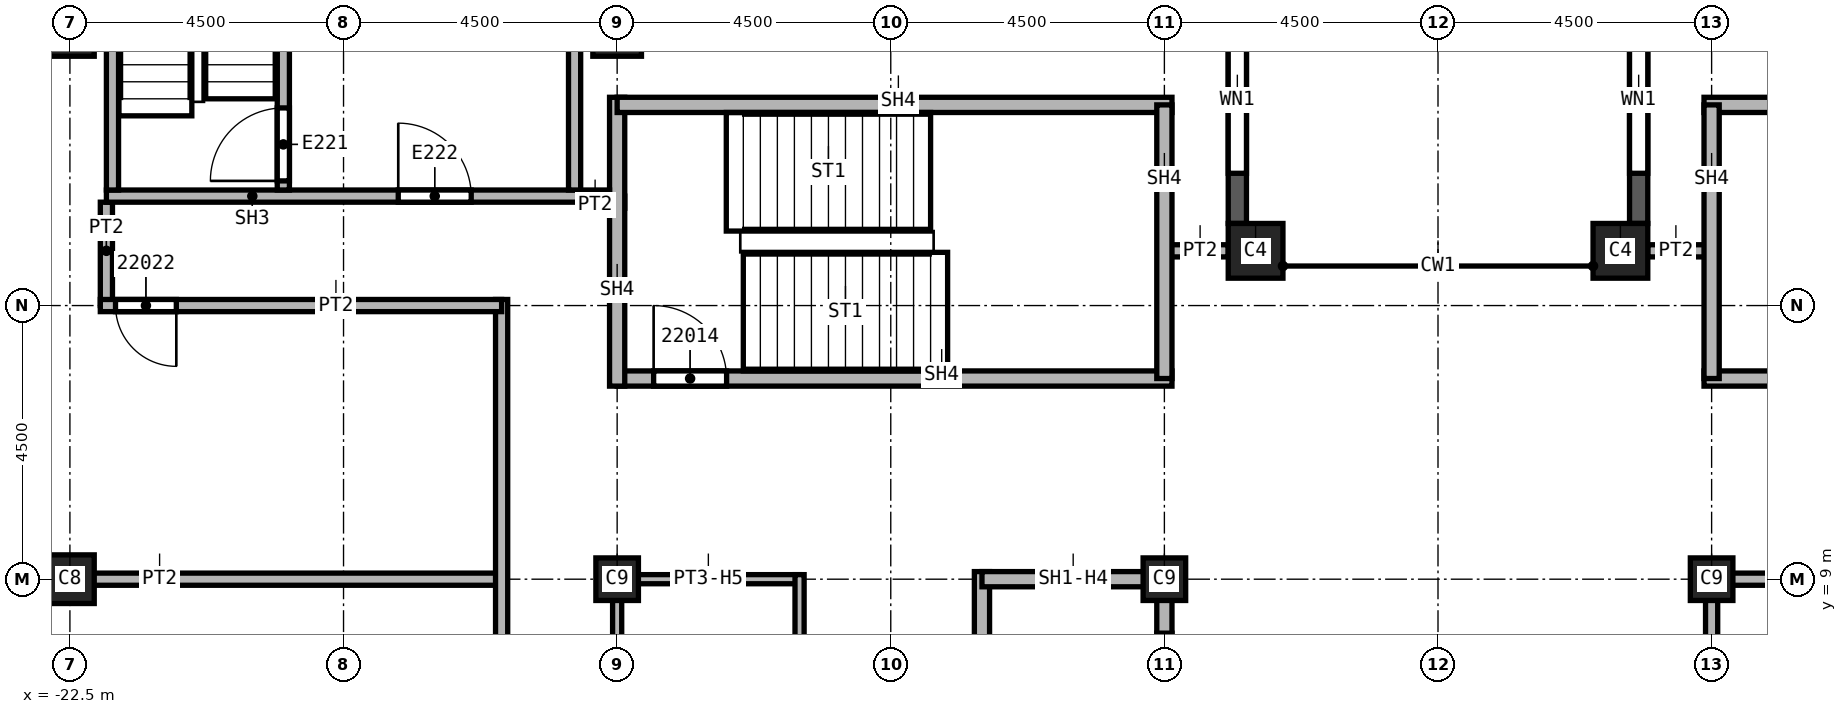
"""IFC4 building model, lengths in metres.
Left out: names, types, materials, properties, quantities, classifications, styles, units other than length and angle.
Written with IfcOpenShell. Run it as: python <this file> out.ifc"""

import sys

from ifc_helpers import new_model, si_unit, direction, frame, frame_2d, origin, origin_2d, place, context, subcontext, project, spatial, rectangle, extrude, element, fill, save


model = new_model("IFC4")
c1 = context("Model", 3, precision=1e-05, world=origin(), true_north=direction((0.0, 1.0)))
c2 = subcontext(c1, "Body", "Model", "MODEL_VIEW")
j1 = project(units=[si_unit("LENGTHUNIT", "METRE"), si_unit("PLANEANGLEUNIT", "RADIAN")], contexts=[c1])
p1 = place(None, origin())
s1 = spatial("IfcSite", under=j1, at=p1, CompositionType="ELEMENT")
p2 = place(p1, origin())
s2 = spatial("IfcBuilding", under=s1, at=p2, CompositionType="ELEMENT")
p3 = place(p2, frame((0.0, 0.0, 316.0)))
s3 = spatial("IfcBuildingStorey", under=s2, at=p3, CompositionType="ELEMENT", Elevation=316.0)
for number, where, z_axis, x_axis in (
    (1, (-13.5, 18.0, 0.0), (0.0, 0.0, 1.0), (1.0, 0.0, 0.0)),
    (2, (-22.5, 9.0, 0.0), (0.0, 0.0, 1.0), (1.0, 0.0, 0.0)),
    (3, (-22.5, 18.0, 0.0), (0.0, 0.0, 1.0), (1.0, 0.0, 0.0)),
):
    element("IfcColumn", number, at=place(p3, frame(where, z_axis=z_axis, x_axis=x_axis)), inside=s3, PredefinedType="COLUMN", context=c2, shape_type="SweptSolid", body=[
        extrude(rectangle(XDim=0.8, YDim=0.8, at=origin_2d()), origin(), (0.0, 0.0, 1.0), 3.59),
    ])
for number, where, z_axis, x_axis in (
    (4, (4.5, 9.0, 0.0), (0.0, 0.0, 1.0), (1.0, 0.0, 0.0)),
    (5, (-4.5, 9.0, 0.0), (0.0, 0.0, 1.0), (1.0, 0.0, 0.0)),
    (6, (-13.5, 9.0, 0.0), (0.0, 0.0, 1.0), (1.0, 0.0, 0.0)),
):
    element("IfcColumn", number, at=place(p3, frame(where, z_axis=z_axis, x_axis=x_axis)), inside=s3, PredefinedType="COLUMN", context=c2, shape_type="SweptSolid", body=[
        extrude(rectangle(XDim=0.7, YDim=0.7, at=origin_2d()), origin(), (0.0, 0.0, 1.0), 3.59),
    ])
for number, where, z_axis, x_axis in (
    (7, (3.0, 14.4, 0.0), (0.0, 0.0, 1.0), (1.0, 0.0, 0.0)),
    (8, (-3.0, 14.4, 0.0), (0.0, 0.0, 1.0), (1.0, 0.0, 0.0)),
):
    element("IfcColumn", number, at=place(p3, frame(where, z_axis=z_axis, x_axis=x_axis)), inside=s3, PredefinedType="COLUMN", context=c2, shape_type="SweptSolid", body=[
        extrude(rectangle(XDim=0.9, YDim=0.9, at=origin_2d()), origin(), (0.0, 0.0, 1.0), 3.59),
    ])
p4 = place(p3, frame((3.3, 22.95, 0.0), z_axis=(0.0, 0.0, 1.0), x_axis=(0.0, -1.0, 0.0)))
e9 = element("IfcWall", 9, at=p4, inside=s3, PredefinedType="SOLIDWALL", context=c2, shape_type="SweptSolid", body=[
    extrude(rectangle(XDim=8.1, YDim=0.3, at=frame_2d((4.05, 0.0))), origin(), (0.0, 0.0, 1.0), 2.99),
])
p5 = place(p4, frame((0.825, 0.0, 0.8)))
e10 = element("IfcOpeningElement", 10, at=p5, cuts=e9, PredefinedType="OPENING", context=c2, shape_type="SweptSolid", body=[
    extrude(rectangle(XDim=2.4, YDim=1.95, at=frame_2d((1.2, 0.975))), frame((0.0, 0.15, 0.0), z_axis=(0.0, -1.0, 0.0), x_axis=(1.0, 0.0, 0.0)), (0.0, 0.0, 1.0), 0.3),
])
p6 = place(p4, frame((4.875, 0.0, 0.8)))
e11 = element("IfcOpeningElement", 11, at=p6, cuts=e9, PredefinedType="OPENING", context=c2, shape_type="SweptSolid", body=[
    extrude(rectangle(XDim=2.4, YDim=1.95, at=frame_2d((1.2, 0.975))), frame((0.0, 0.15, 0.0), z_axis=(0.0, -1.0, 0.0), x_axis=(1.0, 0.0, 0.0)), (0.0, 0.0, 1.0), 0.3),
])
p7 = place(p3, frame((-3.3, 14.85, 0.0), z_axis=(0.0, 0.0, 1.0), x_axis=(0.0, 1.0, 0.0)))
e12 = element("IfcWall", 12, at=p7, inside=s3, PredefinedType="SOLIDWALL", context=c2, shape_type="SweptSolid", body=[
    extrude(rectangle(XDim=8.1, YDim=0.3, at=frame_2d((4.05, 0.0))), origin(), (0.0, 0.0, 1.0), 2.99),
])
p8 = place(p7, frame((0.825, 0.0, 0.8)))
e13 = element("IfcOpeningElement", 13, at=p8, cuts=e12, PredefinedType="OPENING", context=c2, shape_type="SweptSolid", body=[
    extrude(rectangle(XDim=2.4, YDim=1.95, at=frame_2d((1.2, 0.975))), frame((0.0, 0.15, 0.0), z_axis=(0.0, -1.0, 0.0), x_axis=(1.0, 0.0, 0.0)), (0.0, 0.0, 1.0), 0.3),
])
p9 = place(p7, frame((4.875, 0.0, 0.8)))
e14 = element("IfcOpeningElement", 14, at=p9, cuts=e12, PredefinedType="OPENING", context=c2, shape_type="SweptSolid", body=[
    extrude(rectangle(XDim=2.4, YDim=1.95, at=frame_2d((1.2, 0.975))), frame((0.0, 0.15, 0.0), z_axis=(0.0, -1.0, 0.0), x_axis=(1.0, 0.0, 0.0)), (0.0, 0.0, 1.0), 0.3),
])
p10 = place(p3, frame((-26.55, 9.0, 0.0), z_axis=(0.0, 0.0, 1.0), x_axis=(1.0, 0.0, 0.0)))
e15 = element("IfcWall", 15, at=p10, inside=s3, PredefinedType="PARTITIONING", context=c2, shape_type="SweptSolid", body=[
    extrude(rectangle(XDim=11.15, YDim=0.2, at=frame_2d((5.575, 0.0))), origin(), (0.0, 0.0, 1.0), 3.59),
])
p11 = place(p3, frame((-21.9, 13.5, 0.0), z_axis=(0.0, 0.0, 1.0), x_axis=(0.0, 1.0, 0.0)))
e16 = element("IfcWall", 16, at=p11, inside=s3, PredefinedType="PARTITIONING", context=c2, shape_type="SweptSolid", body=[
    extrude(rectangle(XDim=1.7, YDim=0.2, at=frame_2d((0.85, 0.0))), origin(), (0.0, 0.0, 1.0), 3.59),
])
p12 = place(p3, frame((-15.4, -22.95, 0.0), z_axis=(0.0, 0.0, 1.0), x_axis=(0.0, 1.0, 0.0)))
e17 = element("IfcWall", 17, at=p12, inside=s3, PredefinedType="PARTITIONING", context=c2, shape_type="SweptSolid", body=[
    extrude(rectangle(XDim=36.55, YDim=0.2, at=frame_2d((18.275, 0.0))), origin(), (0.0, 0.0, 1.0), 3.59),
])
p13 = place(p12, frame((24.3, 0.0, 0.0)))
e18 = element("IfcOpeningElement", 18, at=p13, cuts=e17, PredefinedType="OPENING", context=c2, shape_type="SweptSolid", body=[
    extrude(rectangle(XDim=1.0, YDim=2.1, at=frame_2d((0.5, 1.05))), frame((0.0, 0.1, 0.0), z_axis=(0.0, -1.0, 0.0), x_axis=(1.0, 0.0, 0.0)), (0.0, 0.0, 1.0), 0.2),
])
p14 = place(p12, frame((9.4, 0.0, 0.0)))
e19 = element("IfcOpeningElement", 19, at=p14, cuts=e17, PredefinedType="OPENING", context=c2, shape_type="SweptSolid", body=[
    extrude(rectangle(XDim=1.0, YDim=2.1, at=frame_2d((0.5, 1.05))), frame((0.0, 0.1, 0.0), z_axis=(0.0, -1.0, 0.0), x_axis=(1.0, 0.0, 0.0)), (0.0, 0.0, 1.0), 0.2),
])
p15 = place(p12, frame((19.05, 0.0, 0.0)))
e20 = element("IfcOpeningElement", 20, at=p15, cuts=e17, PredefinedType="OPENING", context=c2, shape_type="SweptSolid", body=[
    extrude(rectangle(XDim=1.0, YDim=2.1, at=frame_2d((0.5, 1.05))), frame((0.0, 0.1, 0.0), z_axis=(0.0, -1.0, 0.0), x_axis=(1.0, 0.0, 0.0)), (0.0, 0.0, 1.0), 0.2),
])
p16 = place(p3, frame((-15.4, 13.5, 0.0), z_axis=(0.0, 0.0, 1.0), x_axis=(-1.0, 0.0, 0.0)))
e21 = element("IfcWall", 21, at=p16, inside=s3, PredefinedType="PARTITIONING", context=c2, shape_type="SweptSolid", body=[
    extrude(rectangle(XDim=6.6, YDim=0.2, at=frame_2d((3.3, 0.0))), origin(), (0.0, 0.0, 1.0), 3.59),
])
p17 = place(p16, frame((5.35, 0.0, 0.0)))
e22 = element("IfcOpeningElement", 22, at=p17, cuts=e21, PredefinedType="OPENING", context=c2, shape_type="SweptSolid", body=[
    extrude(rectangle(XDim=1.0, YDim=2.1, at=frame_2d((0.5, 1.05))), frame((0.0, 0.1, 0.0), z_axis=(0.0, -1.0, 0.0), x_axis=(1.0, 0.0, 0.0)), (0.0, 0.0, 1.0), 0.2),
])
p18 = place(p3, frame((-14.1, 15.2, 0.0), z_axis=(0.0, 0.0, 1.0), x_axis=(1.0, 0.0, 0.0)))
e23 = element("IfcWall", 23, at=p18, inside=s3, PredefinedType="PARTITIONING", context=c2, shape_type="SweptSolid", body=[
    extrude(rectangle(XDim=0.725, YDim=0.2, at=frame_2d((0.363, 0.0))), origin(), (0.0, 0.0, 1.0), 3.59),
])
for number, where, z_axis, x_axis in (
    (24, (-4.5, 14.4, 0.0), (0.0, 0.0, 1.0), (1.0, 0.0, 0.0)),
    (25, (3.45, 14.4, 0.0), (0.0, 0.0, 1.0), (1.0, 0.0, 0.0)),
):
    element("IfcWall", number, at=place(p3, frame(where, z_axis=z_axis, x_axis=x_axis)), inside=s3, PredefinedType="PARTITIONING", context=c2, shape_type="SweptSolid", body=[
        extrude(rectangle(XDim=1.05, YDim=0.2, at=frame_2d((0.525, 0.0))), origin(), (0.0, 0.0, 1.0), 3.59),
    ])
p19 = place(p3, frame((4.5, -6.0, 0.0), z_axis=(0.0, 0.0, 1.0), x_axis=(0.0, 1.0, 0.0)))
e26 = element("IfcWall", 26, at=p19, inside=s3, PredefinedType="SOLIDWALL", context=c2, shape_type="SweptSolid", body=[
    extrude(rectangle(XDim=15.1, YDim=0.2, at=frame_2d((7.55, 0.0))), origin(), (0.0, 0.0, 1.0), 2.828),
])
p20 = place(p19, frame((3.1, 0.0, 0.0)))
e27 = element("IfcOpeningElement", 27, at=p20, cuts=e26, PredefinedType="OPENING", context=c2, shape_type="SweptSolid", body=[
    extrude(rectangle(XDim=1.1, YDim=2.1, at=frame_2d((0.55, 1.05))), frame((0.0, 0.1, 0.0), z_axis=(0.0, -1.0, 0.0), x_axis=(1.0, 0.0, 0.0)), (0.0, 0.0, 1.0), 0.2),
])
p21 = place(p19, frame((9.7, 0.0, 0.0)))
e28 = element("IfcOpeningElement", 28, at=p21, cuts=e26, PredefinedType="OPENING", context=c2, shape_type="SweptSolid", body=[
    extrude(rectangle(XDim=1.1, YDim=2.1, at=frame_2d((0.55, 1.05))), frame((0.0, 0.1, 0.0), z_axis=(0.0, -1.0, 0.0), x_axis=(1.0, 0.0, 0.0)), (0.0, 0.0, 1.0), 0.2),
])
p22 = place(p3, frame((4.5, 9.0, 0.0), z_axis=(0.0, 0.0, 1.0), x_axis=(1.0, 0.0, 0.0)))
e29 = element("IfcWall", 29, at=p22, inside=s3, PredefinedType="SOLIDWALL", context=c2, shape_type="SweptSolid", body=[
    extrude(rectangle(XDim=3.0, YDim=0.2, at=frame_2d((1.5, 0.0))), origin(), (0.0, 0.0, 1.0), 2.828),
])
p23 = place(p3, frame((-7.5, 6.0, 0.0), z_axis=(0.0, 0.0, 1.0), x_axis=(0.0, 1.0, 0.0)))
e30 = element("IfcWall", 30, at=p23, inside=s3, PredefinedType="SOLIDWALL", context=c2, shape_type="SweptSolid", body=[
    extrude(rectangle(XDim=3.125, YDim=0.25, at=frame_2d((1.562, 0.0))), origin(), (0.0, 0.0, 1.0), 3.59),
])
p24 = place(p3, frame((-7.5, 9.0, 0.0), z_axis=(0.0, 0.0, 1.0), x_axis=(1.0, 0.0, 0.0)))
e31 = element("IfcWall", 31, at=p24, inside=s3, PredefinedType="SOLIDWALL", context=c2, shape_type="SweptSolid", body=[
    extrude(rectangle(XDim=3.0, YDim=0.25, at=frame_2d((1.5, 0.0))), origin(), (0.0, 0.0, 1.0), 2.828),
])
p25 = place(p3, frame((-4.5, 9.125, 0.0), z_axis=(0.0, 0.0, 1.0), x_axis=(0.0, -1.0, 0.0)))
e32 = element("IfcWall", 32, at=p25, inside=s3, PredefinedType="SOLIDWALL", context=c2, shape_type="SweptSolid", body=[
    extrude(rectangle(XDim=3.125, YDim=0.25, at=frame_2d((1.562, 0.0))), origin(), (0.0, 0.0, 1.0), 2.828),
])
p26 = place(p25, frame((1.012, 0.0, 0.0)))
e33 = element("IfcOpeningElement", 33, at=p26, cuts=e32, PredefinedType="OPENING", context=c2, shape_type="SweptSolid", body=[
    extrude(rectangle(XDim=1.1, YDim=2.1, at=frame_2d((0.55, 1.05))), frame((0.0, 0.125, 0.0), z_axis=(0.0, -1.0, 0.0), x_axis=(1.0, 0.0, 0.0)), (0.0, 0.0, 1.0), 0.25),
])
p27 = place(p3, frame((-13.5, 12.3, 0.0), z_axis=(0.0, 0.0, 1.0), x_axis=(1.0, 0.0, 0.0)))
e34 = element("IfcWall", 34, at=p27, inside=s3, PredefinedType="SOLIDWALL", context=c2, shape_type="SweptSolid", body=[
    extrude(rectangle(XDim=9.125, YDim=0.25, at=frame_2d((4.562, 0.0))), origin(), (0.0, 0.0, 1.0), 3.59),
])
p28 = place(p27, frame((0.6, 0.0, 0.0)))
e35 = element("IfcOpeningElement", 35, at=p28, cuts=e34, PredefinedType="OPENING", context=c2, shape_type="SweptSolid", body=[
    extrude(rectangle(XDim=1.2, YDim=2.1, at=frame_2d((0.6, 1.05))), frame((0.0, 0.125, 0.0), z_axis=(0.0, -1.0, 0.0), x_axis=(1.0, 0.0, 0.0)), (0.0, 0.0, 1.0), 0.25),
])
p29 = place(p3, frame((-13.5, 12.175, 0.0), z_axis=(0.0, 0.0, 1.0), x_axis=(0.0, 1.0, 0.0)))
e36 = element("IfcWall", 36, at=p29, inside=s3, PredefinedType="SOLIDWALL", context=c2, shape_type="SweptSolid", body=[
    extrude(rectangle(XDim=4.75, YDim=0.25, at=frame_2d((2.375, 0.0))), origin(), (0.0, 0.0, 1.0), 3.59),
])
p30 = place(p3, frame((-13.5, 16.8, 0.0), z_axis=(0.0, 0.0, 1.0), x_axis=(1.0, 0.0, 0.0)))
e37 = element("IfcWall", 37, at=p30, inside=s3, PredefinedType="SOLIDWALL", context=c2, shape_type="SweptSolid", body=[
    extrude(rectangle(XDim=9.125, YDim=0.25, at=frame_2d((4.562, 0.0))), origin(), (0.0, 0.0, 1.0), 3.59),
])
p31 = place(p3, frame((-4.5, 16.8, 0.0), z_axis=(0.0, 0.0, 1.0), x_axis=(0.0, -1.0, 0.0)))
e38 = element("IfcWall", 38, at=p31, inside=s3, PredefinedType="SOLIDWALL", context=c2, shape_type="SweptSolid", body=[
    extrude(rectangle(XDim=4.5, YDim=0.25, at=frame_2d((2.25, 0.0))), origin(), (0.0, 0.0, 1.0), 3.59),
])
p32 = place(p3, frame((4.375, 12.3, 0.0), z_axis=(0.0, 0.0, 1.0), x_axis=(1.0, 0.0, 0.0)))
e39 = element("IfcWall", 39, at=p32, inside=s3, PredefinedType="SOLIDWALL", context=c2, shape_type="SweptSolid", body=[
    extrude(rectangle(XDim=9.125, YDim=0.25, at=frame_2d((4.562, 0.0))), origin(), (0.0, 0.0, 1.0), 3.59),
])
p33 = place(p32, frame((7.2, 0.0, 0.0)))
e40 = element("IfcOpeningElement", 40, at=p33, cuts=e39, PredefinedType="OPENING", context=c2, shape_type="SweptSolid", body=[
    extrude(rectangle(XDim=1.2, YDim=2.1, at=frame_2d((0.6, 1.05))), frame((0.0, 0.125, 0.0), z_axis=(0.0, -1.0, 0.0), x_axis=(1.0, 0.0, 0.0)), (0.0, 0.0, 1.0), 0.25),
])
p34 = place(p3, frame((4.375, 16.8, 0.0), z_axis=(0.0, 0.0, 1.0), x_axis=(1.0, 0.0, 0.0)))
e41 = element("IfcWall", 41, at=p34, inside=s3, PredefinedType="SOLIDWALL", context=c2, shape_type="SweptSolid", body=[
    extrude(rectangle(XDim=9.125, YDim=0.25, at=frame_2d((4.562, 0.0))), origin(), (0.0, 0.0, 1.0), 3.59),
])
p35 = place(p3, frame((4.5, 12.3, 0.0), z_axis=(0.0, 0.0, 1.0), x_axis=(0.0, 1.0, 0.0)))
e42 = element("IfcWall", 42, at=p35, inside=s3, PredefinedType="SOLIDWALL", context=c2, shape_type="SweptSolid", body=[
    extrude(rectangle(XDim=4.5, YDim=0.25, at=frame_2d((2.25, 0.0))), origin(), (0.0, 0.0, 1.0), 3.59),
])
p36 = place(p3, frame((-13.5, 3.0, 0.0), z_axis=(0.0, 0.0, 1.0), x_axis=(0.0, 1.0, 0.0)))
e43 = element("IfcWall", 43, at=p36, inside=s3, PredefinedType="PARTITIONING", context=c2, shape_type="SweptSolid", body=[
    extrude(rectangle(XDim=6.075, YDim=0.15, at=frame_2d((3.038, 0.0))), origin(), (0.0, 0.0, 1.0), 2.828),
])
p37 = place(p3, frame((-13.5, 9.0, 0.0), z_axis=(0.0, 0.0, 1.0), x_axis=(1.0, 0.0, 0.0)))
e44 = element("IfcWall", 44, at=p37, inside=s3, PredefinedType="PARTITIONING", context=c2, shape_type="SweptSolid", body=[
    extrude(rectangle(XDim=3.0, YDim=0.15, at=frame_2d((1.5, 0.0))), origin(), (0.0, 0.0, 1.0), 2.828),
])
p38 = place(p3, frame((-10.5, 2.875, 0.0), z_axis=(0.0, 0.0, 1.0), x_axis=(0.0, 1.0, 0.0)))
e45 = element("IfcWall", 45, at=p38, inside=s3, PredefinedType="PARTITIONING", context=c2, shape_type="SweptSolid", body=[
    extrude(rectangle(XDim=6.2, YDim=0.15, at=frame_2d((3.1, 0.0))), origin(), (0.0, 0.0, 1.0), 3.59),
])
p39 = place(p38, frame((3.55, 0.0, 0.0)))
e46 = element("IfcOpeningElement", 46, at=p39, cuts=e45, PredefinedType="OPENING", context=c2, shape_type="SweptSolid", body=[
    extrude(rectangle(XDim=0.9, YDim=2.1, at=frame_2d((0.45, 1.05))), frame((0.0, 0.075, 0.0), z_axis=(0.0, -1.0, 0.0), x_axis=(1.0, 0.0, 0.0)), (0.0, 0.0, 1.0), 0.15),
])
p40 = place(p3, frame((-21.9, 15.3, 0.0), z_axis=(0.0, 0.0, 1.0), x_axis=(1.0, 0.0, 0.0)))
e47 = element("IfcWall", 47, at=p40, inside=s3, PredefinedType="SOLIDWALL", context=c2, shape_type="SweptSolid", body=[
    extrude(rectangle(XDim=8.275, YDim=0.2, at=frame_2d((4.137, 0.0))), origin(), (0.0, 0.0, 1.0), 3.59),
])
p41 = place(p40, frame((4.8, 0.0, 0.0)))
e48 = element("IfcOpeningElement", 48, at=p41, cuts=e47, PredefinedType="OPENING", context=c2, shape_type="SweptSolid", body=[
    extrude(rectangle(XDim=1.2, YDim=2.1, at=frame_2d((0.6, 1.05))), frame((0.0, 0.1, 0.0), z_axis=(0.0, -1.0, 0.0), x_axis=(1.0, 0.0, 0.0)), (0.0, 0.0, 1.0), 0.2),
])
for number, where, z_axis, x_axis in (
    (49, (-21.8, 15.4, 0.0), (0.0, 0.0, 1.0), (0.0, 1.0, 0.0)),
    (50, (-14.2, 15.4, 0.0), (0.0, 0.0, 1.0), (0.0, 1.0, 0.0)),
):
    element("IfcWall", number, at=place(p3, frame(where, z_axis=z_axis, x_axis=x_axis)), inside=s3, PredefinedType="SOLIDWALL", context=c2, shape_type="SweptSolid", body=[
        extrude(rectangle(XDim=5.9, YDim=0.2, at=frame_2d((2.95, 0.0))), origin(), (0.0, 0.0, 1.0), 3.59),
    ])
p42 = place(p3, frame((-18.99, 15.4, 0.0), z_axis=(0.0, 0.0, 1.0), x_axis=(0.0, 1.0, 0.0)))
e51 = element("IfcWall", 51, at=p42, inside=s3, PredefinedType="SOLIDWALL", context=c2, shape_type="SweptSolid", body=[
    extrude(rectangle(XDim=5.9, YDim=0.2, at=frame_2d((2.95, 0.0))), origin(), (0.0, 0.0, 1.0), 3.59),
])
p43 = place(p42, frame((0.15, 0.0, 0.0)))
e52 = element("IfcOpeningElement", 52, at=p43, cuts=e51, PredefinedType="OPENING", context=c2, shape_type="SweptSolid", body=[
    extrude(rectangle(XDim=1.2, YDim=2.1, at=frame_2d((0.6, 1.05))), frame((0.0, 0.1, 0.0), z_axis=(0.0, -1.0, 0.0), x_axis=(1.0, 0.0, 0.0)), (0.0, 0.0, 1.0), 0.2),
])
p44 = place(p6, origin())
e53 = element("IfcWindow", 53, at=p44, inside=s3, PartitioningType="SINGLE_PANEL", PredefinedType="WINDOW", context=c2, shape_type="SweptSolid", body=[
    extrude(rectangle(XDim=2.4, YDim=1.95, at=frame_2d((1.2, 0.975))), frame((0.0, 0.03, 0.0), z_axis=(0.0, -1.0, 0.0), x_axis=(1.0, 0.0, 0.0)), (0.0, 0.0, 1.0), 0.06),
])
fill(e11, e53)
p45 = place(p8, origin())
e54 = element("IfcWindow", 54, at=p45, inside=s3, PartitioningType="SINGLE_PANEL", PredefinedType="WINDOW", context=c2, shape_type="SweptSolid", body=[
    extrude(rectangle(XDim=2.4, YDim=1.95, at=frame_2d((1.2, 0.975))), frame((0.0, 0.03, 0.0), z_axis=(0.0, -1.0, 0.0), x_axis=(1.0, 0.0, 0.0)), (0.0, 0.0, 1.0), 0.06),
])
fill(e13, e54)
p46 = place(p28, origin())
e55 = element("IfcDoor", 55, at=p46, inside=s3, OperationType="SINGLE_SWING_LEFT", PredefinedType="DOOR", context=c2, shape_type="SweptSolid", body=[
    extrude(rectangle(XDim=1.2, YDim=2.1, at=frame_2d((0.6, 1.05))), frame((0.0, 0.025, 0.0), z_axis=(0.0, -1.0, 0.0), x_axis=(1.0, 0.0, 0.0)), (0.0, 0.0, 1.0), 0.05),
])
fill(e35, e55)
p47 = place(p17, origin())
e56 = element("IfcDoor", 56, at=p47, inside=s3, OperationType="SINGLE_SWING_LEFT", PredefinedType="DOOR", context=c2, shape_type="SweptSolid", body=[
    extrude(rectangle(XDim=1.0, YDim=2.1, at=frame_2d((0.5, 1.05))), frame((0.0, 0.025, 0.0), z_axis=(0.0, -1.0, 0.0), x_axis=(1.0, 0.0, 0.0)), (0.0, 0.0, 1.0), 0.05),
])
fill(e22, e56)
p48 = place(p26, origin())
e57 = element("IfcDoor", 57, at=p48, inside=s3, OperationType="SLIDING_TO_LEFT", PredefinedType="DOOR", context=c2, shape_type="SweptSolid", body=[
    extrude(rectangle(XDim=1.1, YDim=2.1, at=frame_2d((0.55, 1.05))), frame((0.0, 0.025, 0.0), z_axis=(0.0, -1.0, 0.0), x_axis=(1.0, 0.0, 0.0)), (0.0, 0.0, 1.0), 0.05),
])
fill(e33, e57)
p49 = place(p43, origin())
e58 = element("IfcDoor", 58, at=p49, inside=s3, OperationType="SINGLE_SWING_LEFT", PredefinedType="DOOR", context=c2, shape_type="SweptSolid", body=[
    extrude(rectangle(XDim=1.2, YDim=2.1, at=frame_2d((0.6, 1.05))), frame((0.0, 0.025, 0.0), z_axis=(0.0, -1.0, 0.0), x_axis=(1.0, 0.0, 0.0)), (0.0, 0.0, 1.0), 0.05),
])
fill(e52, e58)
p50 = place(p41, origin())
e59 = element("IfcDoor", 59, at=p50, inside=s3, OperationType="SINGLE_SWING_RIGHT", PredefinedType="DOOR", context=c2, shape_type="SweptSolid", body=[
    extrude(rectangle(XDim=1.2, YDim=2.1, at=frame_2d((0.6, 1.05))), frame((0.0, 0.025, 0.0), z_axis=(0.0, -1.0, 0.0), x_axis=(1.0, 0.0, 0.0)), (0.0, 0.0, 1.0), 0.05),
])
fill(e48, e59)
save(model, sys.argv[1])
